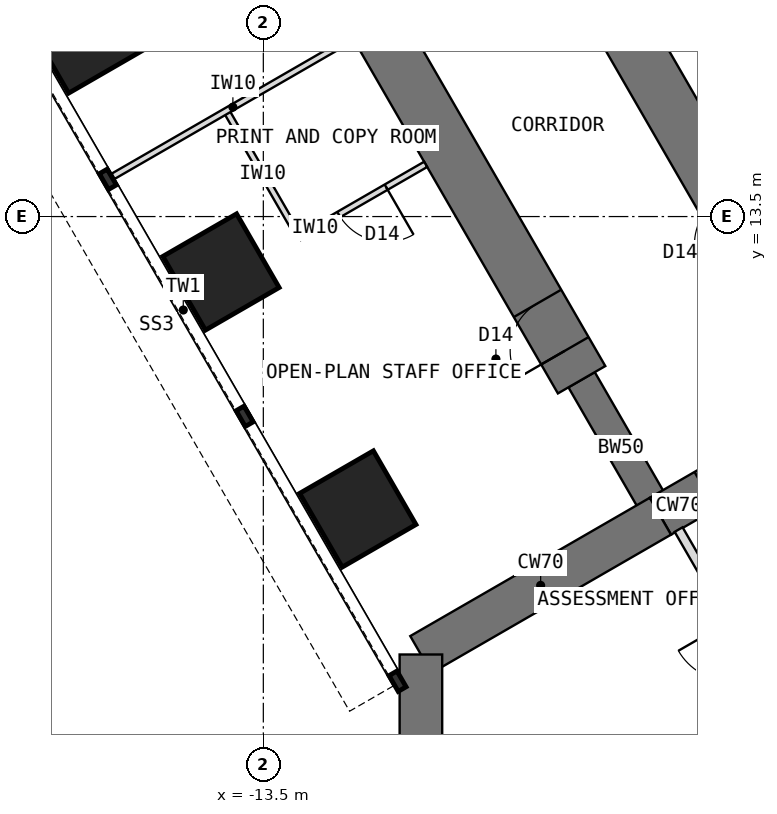
"""IFC4 building model, lengths in metres.
Left out: names, types, materials, properties, quantities, classifications, styles, units other than length and angle.
Written with IfcOpenShell. Run it as: python <this file> out.ifc"""

import sys

from ifc_helpers import new_model, si_unit, direction, frame, frame_2d, origin, origin_2d, place, context, subcontext, project, spatial, rectangle, extrude, element, fill, save


model = new_model("IFC4")
c1 = context("Model", 3, precision=1e-05, world=origin(), true_north=direction((0.0, 1.0)))
c2 = subcontext(c1, "Body", "Model", "MODEL_VIEW")
j1 = project(units=[si_unit("LENGTHUNIT", "METRE"), si_unit("PLANEANGLEUNIT", "RADIAN")], contexts=[c1])
p1 = place(None, origin())
s1 = spatial("IfcSite", under=j1, at=p1, CompositionType="ELEMENT")
p2 = place(p1, origin())
s2 = spatial("IfcBuilding", under=s1, at=p2, CompositionType="ELEMENT")
p3 = place(p2, frame((0.0, 0.0, 80.5)))
s3 = spatial("IfcBuildingStorey", under=s2, at=p3, CompositionType="ELEMENT", Elevation=80.5)
p4 = place(p3, frame((-3.939, 10.322, 0.0), z_axis=(0.0, 0.0, 1.0), x_axis=(-0.866019471182, -0.500010275428, 0.0)))
e1 = element("IfcWall", 1, at=p4, inside=s3, PredefinedType="SHEAR", context=c2, shape_type="SweptSolid", body=[
    extrude(rectangle(XDim=3.5, YDim=0.7, at=frame_2d((1.75, 0.0))), origin(), (0.0, 0.0, 1.0), 4.0),
])
p5 = place(p4, frame((0.85, 0.0, 0.0)))
e2 = element("IfcOpeningElement", 2, at=p5, cuts=e1, PredefinedType="OPENING", context=c2, shape_type="SweptSolid", body=[
    extrude(rectangle(XDim=1.8, YDim=2.1, at=frame_2d((0.9, 1.05))), frame((0.0, 0.36, 0.0), z_axis=(0.0, -1.0, 0.0), x_axis=(1.0, 0.0, 0.0)), (0.0, 0.0, 1.0), 0.72),
])
p6 = place(p3, frame((-6.97, 8.572, 0.0), z_axis=(0.0, 0.0, 1.0), x_axis=(-0.866034513004, -0.499984222037, 0.0)))
e3 = element("IfcWall", 3, at=p6, inside=s3, PredefinedType="SHEAR", context=c2, shape_type="SweptSolid", body=[
    extrude(rectangle(XDim=4.548, YDim=0.7, at=frame_2d((2.274, 0.0))), origin(), (0.0, 0.0, 1.0), 4.0),
])
p7 = place(p3, frame((-10.908, 6.298, 0.0), z_axis=(0.0, 0.0, 1.0), x_axis=(0.0, -1.0, 0.0)))
e4 = element("IfcWall", 4, at=p7, inside=s3, PredefinedType="SHEAR", context=c2, shape_type="SweptSolid", body=[
    extrude(rectangle(XDim=12.596, YDim=0.7, at=frame_2d((6.298, 0.0))), origin(), (0.0, 0.0, 1.0), 4.0),
])
p8 = place(p3, frame((-6.97, 8.572, 0.0), z_axis=(0.0, 0.0, 1.0), x_axis=(-0.499988811324, 0.866031863473, 0.0)))
e5 = element("IfcWall", 5, at=p8, inside=s3, PredefinedType="SHEAR", context=c2, shape_type="SweptSolid", body=[
    extrude(rectangle(XDim=2.592, YDim=0.5, at=frame_2d((1.296, 0.0))), origin(), (0.0, 0.0, 1.0), 4.0),
])
p9 = place(p3, frame((-8.266, 10.816, 0.0), z_axis=(0.0, 0.0, 1.0), x_axis=(-0.499996231654, 0.866027579429, 0.0)))
e6 = element("IfcWall", 6, at=p9, inside=s3, PredefinedType="SHEAR", context=c2, shape_type="SweptSolid", body=[
    extrude(rectangle(XDim=13.2, YDim=0.9, at=frame_2d((6.6, 0.0))), origin(), (0.0, 0.0, 1.0), 4.0),
])
p10 = place(p9, frame((0.55, 0.0, 0.0)))
e7 = element("IfcOpeningElement", 7, at=p10, cuts=e6, PredefinedType="OPENING", context=c2, shape_type="SweptSolid", body=[
    extrude(rectangle(XDim=0.9, YDim=2.1, at=frame_2d((0.45, 1.05))), frame((0.0, 0.46, 0.0), z_axis=(0.0, -1.0, 0.0), x_axis=(1.0, 0.0, 0.0)), (0.0, 0.0, 1.0), 0.92),
])
p11 = place(p9, frame((7.3, 0.0, 0.0)))
e8 = element("IfcOpeningElement", 8, at=p11, cuts=e6, PredefinedType="OPENING", context=c2, shape_type="SweptSolid", body=[
    extrude(rectangle(XDim=0.9, YDim=2.1, at=frame_2d((0.45, 1.05))), frame((0.0, 0.46, 0.0), z_axis=(0.0, -1.0, 0.0), x_axis=(1.0, 0.0, 0.0)), (0.0, 0.0, 1.0), 0.92),
])
p12 = place(p3, frame((-5.234, 12.566, 0.0), z_axis=(0.0, 0.0, 1.0), x_axis=(-0.500010103361, 0.866019570528, 0.0)))
e9 = element("IfcWall", 9, at=p12, inside=s3, PredefinedType="SHEAR", context=c2, shape_type="SweptSolid", body=[
    extrude(rectangle(XDim=13.2, YDim=0.9, at=frame_2d((6.6, 0.0))), origin(), (0.0, 0.0, 1.0), 4.0),
])
p13 = place(p12, frame((0.55, 0.0, 0.0)))
e10 = element("IfcOpeningElement", 10, at=p13, cuts=e9, PredefinedType="OPENING", context=c2, shape_type="SweptSolid", body=[
    extrude(rectangle(XDim=0.9, YDim=2.1, at=frame_2d((0.45, 1.05))), frame((0.0, 0.46, 0.0), z_axis=(0.0, -1.0, 0.0), x_axis=(1.0, 0.0, 0.0)), (0.0, 0.0, 1.0), 0.92),
])
p14 = place(p12, frame((7.3, 0.0, 0.0)))
e11 = element("IfcOpeningElement", 11, at=p14, cuts=e9, PredefinedType="OPENING", context=c2, shape_type="SweptSolid", body=[
    extrude(rectangle(XDim=0.9, YDim=2.1, at=frame_2d((0.45, 1.05))), frame((0.0, 0.46, 0.0), z_axis=(0.0, -1.0, 0.0), x_axis=(1.0, 0.0, 0.0)), (0.0, 0.0, 1.0), 0.92),
])
for number, where, z_axis, x_axis in (
    (12, (-11.946, 8.691, 0.0), (0.0, 0.0, 1.0), (0.866, 0.5, 0.0)),
    (13, (-14.196, 12.588, 0.0), (0.0, 0.0, 1.0), (0.866, 0.5, 0.0)),
    (14, (-16.446, 16.486, 0.0), (0.0, 0.0, 1.0), (0.866, 0.5, 0.0)),
):
    element("IfcColumn", number, at=place(p3, frame(where, z_axis=z_axis, x_axis=x_axis)), inside=s3, PredefinedType="COLUMN", context=c2, shape_type="SweptSolid", body=[
        extrude(rectangle(XDim=1.4, YDim=1.4, at=origin_2d()), origin(), (0.0, 0.0, 1.0), 4.0),
    ])
p15 = place(p3, frame((-12.03, 16.437, 0.0), z_axis=(0.0, 0.0, 1.0), x_axis=(-0.866035472144, -0.499982560684, 0.0)))
e15 = element("IfcWall", 15, at=p15, inside=s3, PredefinedType="PARTITIONING", context=c2, shape_type="SweptSolid", body=[
    extrude(rectangle(XDim=4.55, YDim=0.1, at=frame_2d((2.275, 0.0))), origin(), (0.0, 0.0, 1.0), 3.8),
])
p16 = place(p3, frame((-12.909, 13.158, 0.0), z_axis=(0.0, 0.0, 1.0), x_axis=(-0.499957262057, 0.866050077142, 0.0)))
e16 = element("IfcWall", 16, at=p16, inside=s3, PredefinedType="PARTITIONING", context=c2, shape_type="SweptSolid", body=[
    extrude(rectangle(XDim=2.4, YDim=0.1, at=frame_2d((1.2, 0.0))), origin(), (0.0, 0.0, 1.0), 3.8),
])
p17 = place(p3, frame((-10.83, 14.359, 0.0), z_axis=(0.0, 0.0, 1.0), x_axis=(-0.865980596518, -0.500077600433, 0.0)))
e17 = element("IfcWall", 17, at=p17, inside=s3, PredefinedType="PARTITIONING", context=c2, shape_type="SweptSolid", body=[
    extrude(rectangle(XDim=2.4, YDim=0.1, at=frame_2d((1.2, 0.0))), origin(), (0.0, 0.0, 1.0), 3.8),
])
p18 = place(p17, frame((0.75, 0.0, 0.0)))
e18 = element("IfcOpeningElement", 18, at=p18, cuts=e17, PredefinedType="OPENING", context=c2, shape_type="SweptSolid", body=[
    extrude(rectangle(XDim=0.9, YDim=2.1, at=frame_2d((0.45, 1.05))), frame((0.0, 0.06, 0.0), z_axis=(0.0, -1.0, 0.0), x_axis=(1.0, 0.0, 0.0)), (0.0, 0.0, 1.0), 0.12),
])
p19 = place(p3, frame((-4.436, 4.483, 0.0), z_axis=(0.0, 0.0, 1.0), x_axis=(-0.500017246033, 0.866015446554, 0.0)))
e19 = element("IfcWall", 19, at=p19, inside=s3, PredefinedType="PARTITIONING", context=c2, shape_type="SweptSolid", body=[
    extrude(rectangle(XDim=4.469, YDim=0.15, at=frame_2d((2.234, 0.0))), origin(), (0.0, 0.0, 1.0), 3.8),
])
p20 = place(p19, frame((1.744, 0.0, 0.0)))
e20 = element("IfcOpeningElement", 20, at=p20, cuts=e19, PredefinedType="OPENING", context=c2, shape_type="SweptSolid", body=[
    extrude(rectangle(XDim=1.0, YDim=2.1, at=frame_2d((0.5, 1.05))), frame((0.0, 0.085, 0.0), z_axis=(0.0, -1.0, 0.0), x_axis=(1.0, 0.0, 0.0)), (0.0, 0.0, 1.0), 0.17),
])
p21 = place(p5, origin())
e21 = element("IfcDoor", 21, at=p21, inside=s3, OperationType="DOUBLE_DOOR_DOUBLE_SWING", PredefinedType="DOOR", context=c2, shape_type="SweptSolid", body=[
    extrude(rectangle(XDim=1.72, YDim=2.06, at=frame_2d((0.9, 1.03))), frame((0.0, 0.025, 0.0), z_axis=(0.0, -1.0, 0.0), x_axis=(1.0, 0.0, 0.0)), (0.0, 0.0, 1.0), 0.05),
    extrude(rectangle(XDim=0.04, YDim=2.1, at=frame_2d((0.02, 1.05))), frame((0.0, 0.35, 0.0), z_axis=(0.0, -1.0, 0.0), x_axis=(1.0, 0.0, 0.0)), (0.0, 0.0, 1.0), 0.699),
    extrude(rectangle(XDim=0.04, YDim=2.1, at=frame_2d((1.78, 1.05))), frame((0.0, 0.35, 0.0), z_axis=(0.0, -1.0, 0.0), x_axis=(1.0, 0.0, 0.0)), (0.0, 0.0, 1.0), 0.699),
    extrude(rectangle(XDim=1.72, YDim=0.04, at=frame_2d((0.9, 2.08))), frame((0.0, 0.35, 0.0), z_axis=(0.0, -1.0, 0.0), x_axis=(1.0, 0.0, 0.0)), (0.0, 0.0, 1.0), 0.699),
])
fill(e2, e21)
p22 = place(p18, origin())
e22 = element("IfcDoor", 22, at=p22, inside=s3, OperationType="SINGLE_SWING_LEFT", PredefinedType="DOOR", context=c2, shape_type="SweptSolid", body=[
    extrude(rectangle(XDim=0.9, YDim=2.1, at=frame_2d((0.45, 1.05))), frame((0.0, 0.025, 0.0), z_axis=(0.0, -1.0, 0.0), x_axis=(1.0, 0.0, 0.0)), (0.0, 0.0, 1.0), 0.05),
])
fill(e18, e22)
p23 = place(p10, origin())
e23 = element("IfcDoor", 23, at=p23, inside=s3, OperationType="SINGLE_SWING_LEFT", PredefinedType="DOOR", context=c2, shape_type="SweptSolid", body=[
    extrude(rectangle(XDim=0.82, YDim=2.06, at=frame_2d((0.45, 1.03))), frame((0.0, 0.025, 0.0), z_axis=(0.0, -1.0, 0.0), x_axis=(1.0, 0.0, 0.0)), (0.0, 0.0, 1.0), 0.05),
    extrude(rectangle(XDim=0.04, YDim=2.1, at=frame_2d((0.02, 1.05))), frame((0.0, 0.45, 0.0), z_axis=(0.0, -1.0, 0.0), x_axis=(1.0, 0.0, 0.0)), (0.0, 0.0, 1.0), 0.899),
    extrude(rectangle(XDim=0.04, YDim=2.1, at=frame_2d((0.88, 1.05))), frame((0.0, 0.45, 0.0), z_axis=(0.0, -1.0, 0.0), x_axis=(1.0, 0.0, 0.0)), (0.0, 0.0, 1.0), 0.899),
    extrude(rectangle(XDim=0.82, YDim=0.04, at=frame_2d((0.45, 2.08))), frame((0.0, 0.45, 0.0), z_axis=(0.0, -1.0, 0.0), x_axis=(1.0, 0.0, 0.0)), (0.0, 0.0, 1.0), 0.899),
])
fill(e7, e23)
save(model, sys.argv[1])
